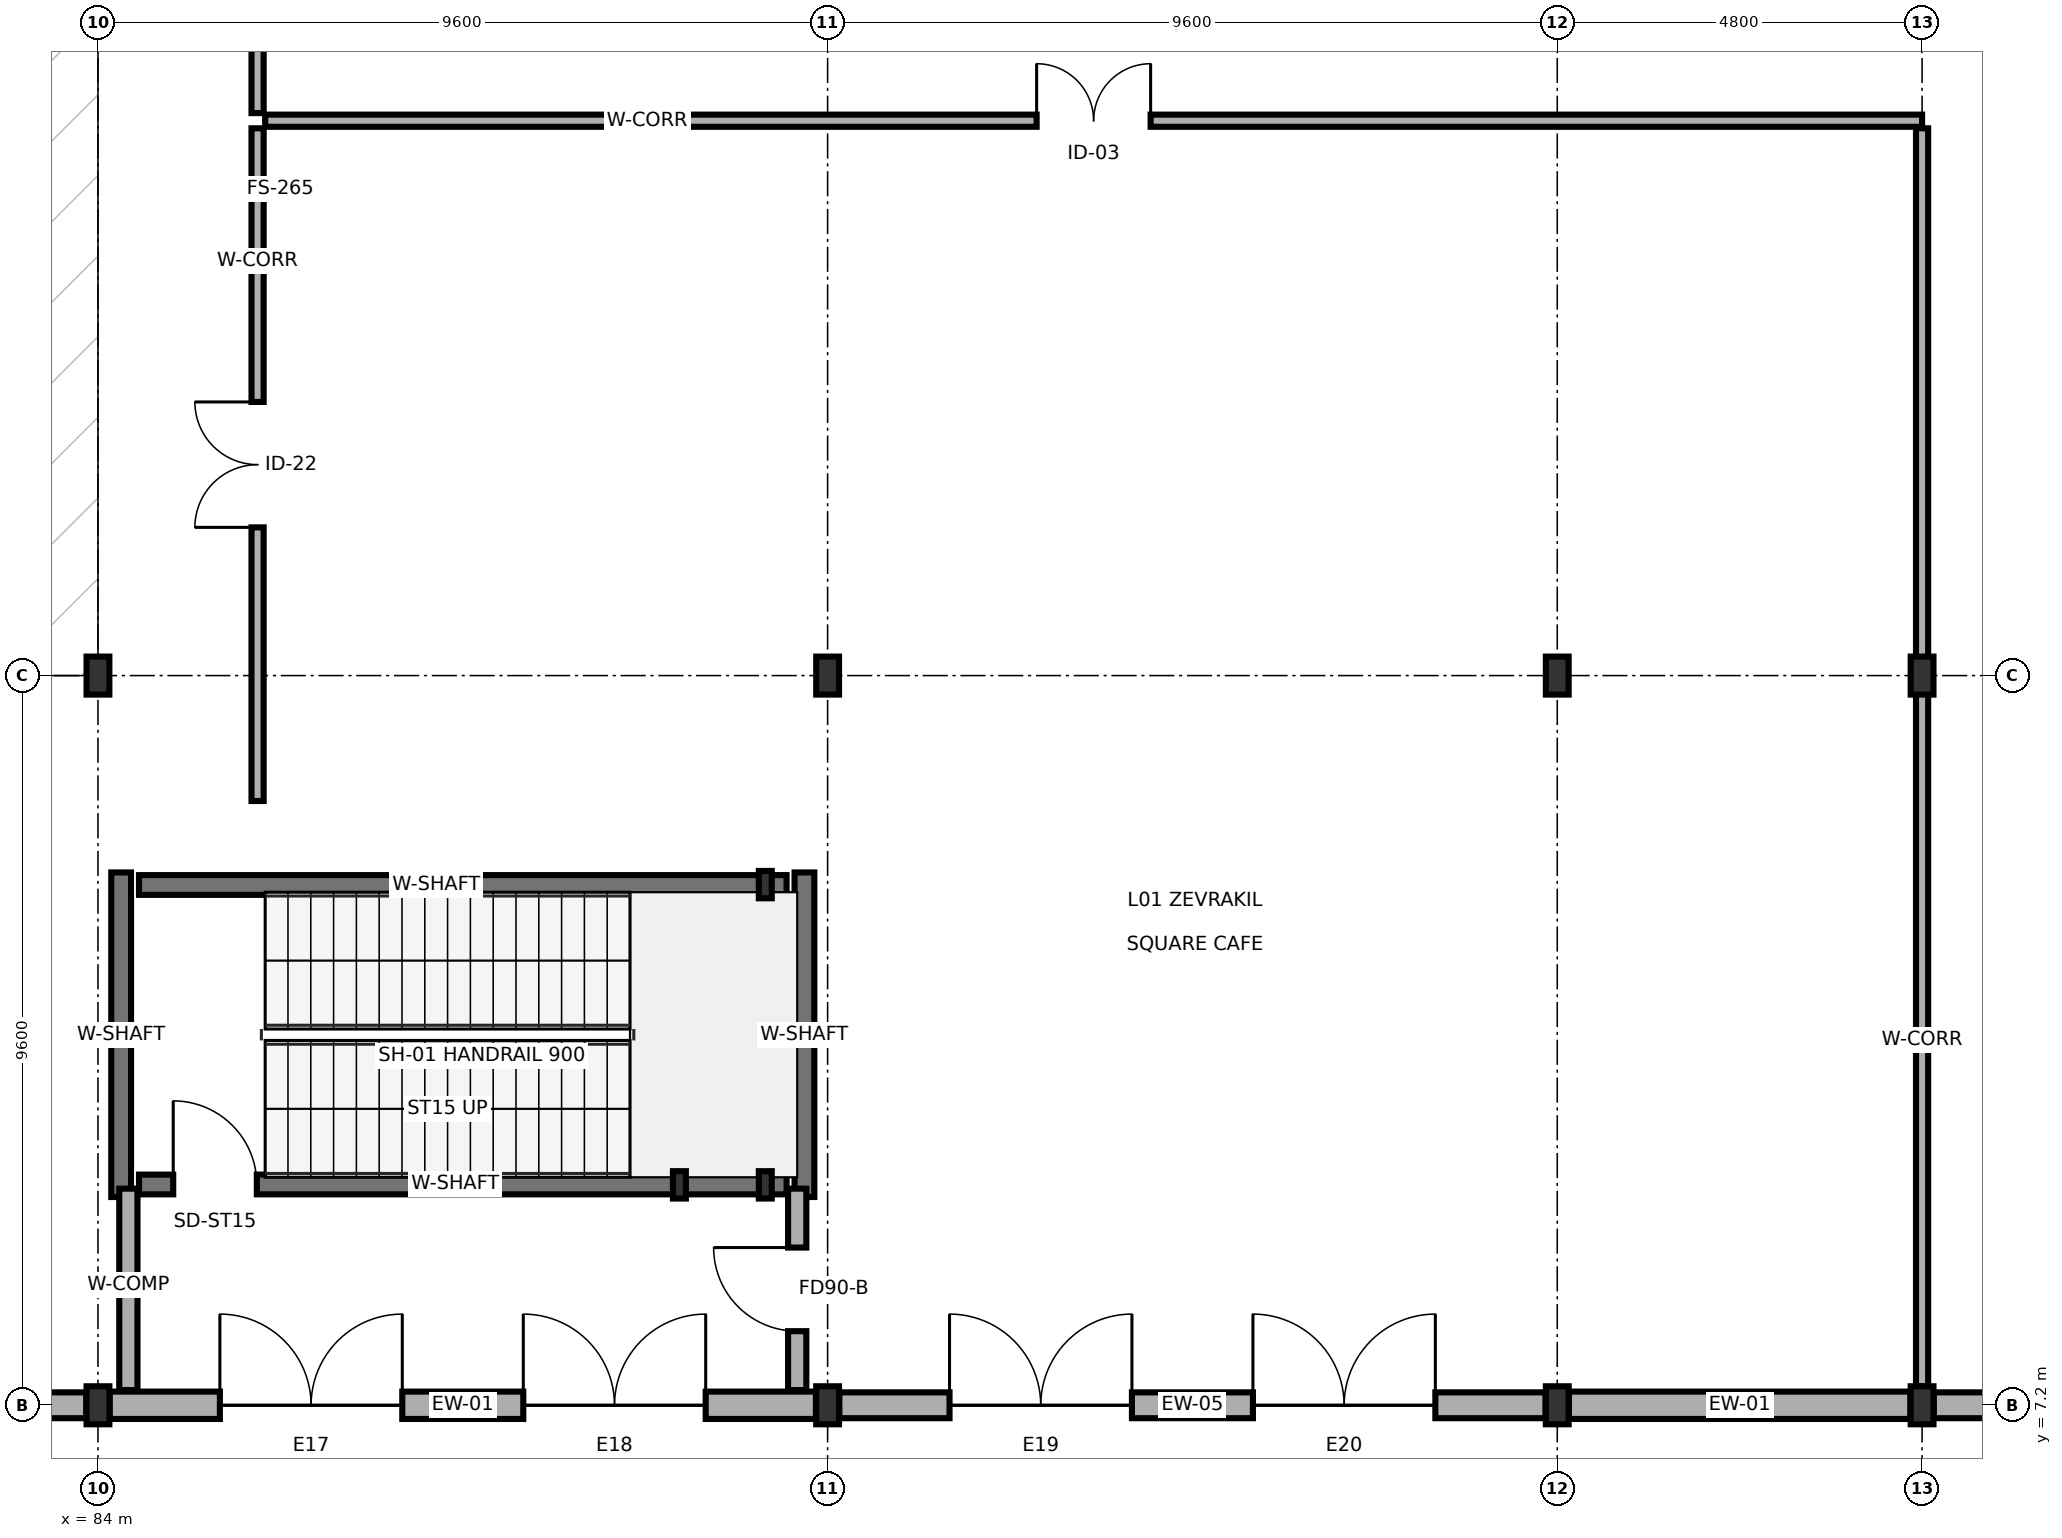
"""IFC4 building model, lengths in metres.
Left out: names, types, materials, properties, quantities, classifications, styles, units other than length and angle.
Written with IfcOpenShell. Run it as: python <this file> out.ifc"""

import sys

from ifc_helpers import new_model, si_unit, direction, frame, frame_2d, origin, origin_2d, place, context, subcontext, project, spatial, rectangle, i_section, extrude, element, fill, save


model = new_model("IFC4")
c1 = context("Model", 3, precision=1e-05, world=origin(), true_north=direction((0.0, 1.0)))
c2 = subcontext(c1, "Body", "Model", "MODEL_VIEW")
j1 = project(units=[si_unit("LENGTHUNIT", "METRE"), si_unit("PLANEANGLEUNIT", "RADIAN")], contexts=[c1])
p1 = place(None, origin())
s1 = spatial("IfcSite", under=j1, at=p1, CompositionType="ELEMENT")
p2 = place(p1, origin())
s2 = spatial("IfcBuilding", under=s1, at=p2, CompositionType="ELEMENT")
p3 = place(p2, origin())
s3 = spatial("IfcBuildingStorey", under=s2, at=p3, CompositionType="ELEMENT", Elevation=0.0)
for number, where, z_axis, x_axis in (
    (1, (84.0, 7.2, 0.0), (0.0, 0.0, 1.0), (1.0, 0.0, 0.0)),
    (2, (84.0, 16.8, 0.0), (0.0, 0.0, 1.0), (1.0, 0.0, 0.0)),
    (3, (93.6, 7.2, 0.0), (0.0, 0.0, 1.0), (1.0, 0.0, 0.0)),
    (4, (93.6, 16.8, 0.0), (0.0, 0.0, 1.0), (1.0, 0.0, 0.0)),
    (5, (103.2, 7.2, 0.0), (0.0, 0.0, 1.0), (1.0, 0.0, 0.0)),
    (6, (103.2, 16.8, 0.0), (0.0, 0.0, 1.0), (1.0, 0.0, 0.0)),
    (7, (108.0, 7.2, 0.0), (0.0, 0.0, 1.0), (1.0, 0.0, 0.0)),
    (8, (108.0, 16.8, 0.0), (0.0, 0.0, 1.0), (1.0, 0.0, 0.0)),
):
    element("IfcColumn", number, at=place(p3, frame(where, z_axis=z_axis, x_axis=x_axis)), inside=s3, PredefinedType="COLUMN", context=c2, shape_type="SweptSolid", body=[
        extrude(i_section(OverallWidth=0.3, OverallDepth=0.5, WebThickness=0.014, FlangeThickness=0.028, FilletRadius=0.027, at=origin_2d()), origin(), (0.0, 0.0, 1.0), 5.4),
    ])
for number, where, z_axis, x_axis in (
    (9, (91.65, 10.1, 0.0), (0.0, 0.0, 1.0), (1.0, 0.0, 0.0)),
    (10, (92.78, 10.1, 0.0), (0.0, 0.0, 1.0), (1.0, 0.0, 0.0)),
    (11, (92.78, 14.05, 0.0), (0.0, 0.0, 1.0), (1.0, 0.0, 0.0)),
):
    element("IfcColumn", number, at=place(p3, frame(where, z_axis=z_axis, x_axis=x_axis)), inside=s3, PredefinedType="PILASTER", context=c2, shape_type="SweptSolid", body=[
        extrude(i_section(OverallWidth=0.17, OverallDepth=0.36, WebThickness=0.008, FlangeThickness=0.013, FilletRadius=0.018, at=origin_2d()), origin(), (0.0, 0.0, 1.0), 5.4),
    ])
p4 = place(p3, frame((74.554, 7.2, 0.0), z_axis=(0.0, 0.0, 1.0), x_axis=(1.0, 0.0, 0.0)))
e12 = element("IfcWall", 12, at=p4, inside=s3, PredefinedType="SOLIDWALL", context=c2, shape_type="SweptSolid", body=[
    extrude(rectangle(XDim=9.292, YDim=0.34, at=frame_2d((4.646, 0.0))), origin(), (0.0, 0.0, 1.0), 4.625),
])
p5 = place(p4, frame((1.45, 0.0, 0.0)))
e13 = element("IfcOpeningElement", 13, at=p5, cuts=e12, PredefinedType="OPENING", context=c2, shape_type="SweptSolid", body=[
    extrude(rectangle(XDim=2.4, YDim=2.4, at=frame_2d((1.2, 1.2))), frame((0.0, 0.18, 0.0), z_axis=(0.0, -1.0, 0.0), x_axis=(1.0, 0.0, 0.0)), (0.0, 0.0, 1.0), 0.36),
])
p6 = place(p4, frame((5.442, 0.0, 0.0)))
e14 = element("IfcOpeningElement", 14, at=p6, cuts=e12, PredefinedType="OPENING", context=c2, shape_type="SweptSolid", body=[
    extrude(rectangle(XDim=2.4, YDim=2.4, at=frame_2d((1.2, 1.2))), frame((0.0, 0.18, 0.0), z_axis=(0.0, -1.0, 0.0), x_axis=(1.0, 0.0, 0.0)), (0.0, 0.0, 1.0), 0.36),
])
p7 = place(p3, frame((84.154, 7.2, 0.0), z_axis=(0.0, 0.0, 1.0), x_axis=(1.0, 0.0, 0.0)))
e15 = element("IfcWall", 15, at=p7, inside=s3, PredefinedType="SOLIDWALL", context=c2, shape_type="SweptSolid", body=[
    extrude(rectangle(XDim=9.292, YDim=0.36, at=frame_2d((4.646, 0.0))), origin(), (0.0, 0.0, 1.0), 4.625),
])
p8 = place(p7, frame((1.45, 0.0, 0.0)))
e16 = element("IfcOpeningElement", 16, at=p8, cuts=e15, PredefinedType="OPENING", context=c2, shape_type="SweptSolid", body=[
    extrude(rectangle(XDim=2.4, YDim=2.4, at=frame_2d((1.2, 1.2))), frame((0.0, 0.19, 0.0), z_axis=(0.0, -1.0, 0.0), x_axis=(1.0, 0.0, 0.0)), (0.0, 0.0, 1.0), 0.38),
])
p9 = place(p7, frame((5.442, 0.0, 0.0)))
e17 = element("IfcOpeningElement", 17, at=p9, cuts=e15, PredefinedType="OPENING", context=c2, shape_type="SweptSolid", body=[
    extrude(rectangle(XDim=2.4, YDim=2.4, at=frame_2d((1.2, 1.2))), frame((0.0, 0.19, 0.0), z_axis=(0.0, -1.0, 0.0), x_axis=(1.0, 0.0, 0.0)), (0.0, 0.0, 1.0), 0.38),
])
p10 = place(p3, frame((93.754, 7.2, 0.0), z_axis=(0.0, 0.0, 1.0), x_axis=(1.0, 0.0, 0.0)))
e18 = element("IfcWall", 18, at=p10, inside=s3, PredefinedType="SOLIDWALL", context=c2, shape_type="SweptSolid", body=[
    extrude(rectangle(XDim=9.292, YDim=0.34, at=frame_2d((4.646, 0.0))), origin(), (0.0, 0.0, 1.0), 4.625),
])
p11 = place(p10, frame((1.45, 0.0, 0.0)))
e19 = element("IfcOpeningElement", 19, at=p11, cuts=e18, PredefinedType="OPENING", context=c2, shape_type="SweptSolid", body=[
    extrude(rectangle(XDim=2.4, YDim=2.4, at=frame_2d((1.2, 1.2))), frame((0.0, 0.18, 0.0), z_axis=(0.0, -1.0, 0.0), x_axis=(1.0, 0.0, 0.0)), (0.0, 0.0, 1.0), 0.36),
])
p12 = place(p10, frame((5.442, 0.0, 0.0)))
e20 = element("IfcOpeningElement", 20, at=p12, cuts=e18, PredefinedType="OPENING", context=c2, shape_type="SweptSolid", body=[
    extrude(rectangle(XDim=2.4, YDim=2.4, at=frame_2d((1.2, 1.2))), frame((0.0, 0.18, 0.0), z_axis=(0.0, -1.0, 0.0), x_axis=(1.0, 0.0, 0.0)), (0.0, 0.0, 1.0), 0.36),
])
p13 = place(p3, frame((103.354, 7.2, 0.0), z_axis=(0.0, 0.0, 1.0), x_axis=(1.0, 0.0, 0.0)))
e21 = element("IfcWall", 21, at=p13, inside=s3, PredefinedType="SOLIDWALL", context=c2, shape_type="SweptSolid", body=[
    extrude(rectangle(XDim=4.492, YDim=0.36, at=frame_2d((2.246, 0.0))), origin(), (0.0, 0.0, 1.0), 4.625),
])
p14 = place(p3, frame((108.154, 7.2, 0.0), z_axis=(0.0, 0.0, 1.0), x_axis=(1.0, 0.0, 0.0)))
e22 = element("IfcWall", 22, at=p14, inside=s3, PredefinedType="SOLIDWALL", context=c2, shape_type="SweptSolid", body=[
    extrude(rectangle(XDim=9.292, YDim=0.34, at=frame_2d((4.646, 0.0))), origin(), (0.0, 0.0, 1.0), 4.625),
])
p15 = place(p14, frame((1.45, 0.0, 0.0)))
e23 = element("IfcOpeningElement", 23, at=p15, cuts=e22, PredefinedType="OPENING", context=c2, shape_type="SweptSolid", body=[
    extrude(rectangle(XDim=2.4, YDim=2.4, at=frame_2d((1.2, 1.2))), frame((0.0, 0.18, 0.0), z_axis=(0.0, -1.0, 0.0), x_axis=(1.0, 0.0, 0.0)), (0.0, 0.0, 1.0), 0.36),
])
p16 = place(p14, frame((5.442, 0.0, 0.0)))
e24 = element("IfcOpeningElement", 24, at=p16, cuts=e22, PredefinedType="OPENING", context=c2, shape_type="SweptSolid", body=[
    extrude(rectangle(XDim=2.4, YDim=2.4, at=frame_2d((1.2, 1.2))), frame((0.0, 0.18, 0.0), z_axis=(0.0, -1.0, 0.0), x_axis=(1.0, 0.0, 0.0)), (0.0, 0.0, 1.0), 0.36),
])
for number, where, z_axis, x_axis in (
    (25, (84.305, 9.94, 0.0), (0.0, 0.0, 1.0), (0.0, 1.0, 0.0)),
    (26, (93.295, 9.94, 0.0), (0.0, 0.0, 1.0), (0.0, 1.0, 0.0)),
):
    element("IfcWall", number, at=place(p3, frame(where, z_axis=z_axis, x_axis=x_axis)), inside=s3, PredefinedType="SHEAR", context=c2, shape_type="SweptSolid", body=[
        extrude(rectangle(XDim=4.27, YDim=0.26, at=frame_2d((2.135, 0.0))), origin(), (0.0, 0.0, 1.0), 5.14),
    ])
p17 = place(p3, frame((84.54, 10.105, 0.0), z_axis=(0.0, 0.0, 1.0), x_axis=(1.0, 0.0, 0.0)))
e27 = element("IfcWall", 27, at=p17, inside=s3, PredefinedType="SHEAR", context=c2, shape_type="SweptSolid", body=[
    extrude(rectangle(XDim=8.52, YDim=0.26, at=frame_2d((4.26, 0.0))), origin(), (0.0, 0.0, 1.0), 5.14),
])
p18 = place(p17, frame((0.45, 0.0, 0.0)))
e28 = element("IfcOpeningElement", 28, at=p18, cuts=e27, PredefinedType="OPENING", context=c2, shape_type="SweptSolid", body=[
    extrude(rectangle(XDim=1.1, YDim=2.2, at=frame_2d((0.55, 1.1))), frame((0.0, 0.14, 0.0), z_axis=(0.0, -1.0, 0.0), x_axis=(1.0, 0.0, 0.0)), (0.0, 0.0, 1.0), 0.28),
])
p19 = place(p3, frame((84.54, 14.045, 0.0), z_axis=(0.0, 0.0, 1.0), x_axis=(1.0, 0.0, 0.0)))
e29 = element("IfcWall", 29, at=p19, inside=s3, PredefinedType="SHEAR", context=c2, shape_type="SweptSolid", body=[
    extrude(rectangle(XDim=8.52, YDim=0.26, at=frame_2d((4.26, 0.0))), origin(), (0.0, 0.0, 1.0), 5.14),
])
p20 = place(p3, frame((86.1, 15.15, 0.0), z_axis=(0.0, 0.0, 1.0), x_axis=(0.0, 1.0, 0.0)))
e30 = element("IfcWall", 30, at=p20, inside=s3, PredefinedType="PARTITIONING", context=c2, shape_type="SweptSolid", body=[
    extrude(rectangle(XDim=8.85, YDim=0.16, at=frame_2d((4.425, 0.0))), origin(), (0.0, 0.0, 1.0), 4.685),
])
p21 = place(p20, frame((3.6, 0.0, 0.0)))
e31 = element("IfcOpeningElement", 31, at=p21, cuts=e30, PredefinedType="OPENING", context=c2, shape_type="SweptSolid", body=[
    extrude(rectangle(XDim=1.65, YDim=2.26, at=frame_2d((0.825, 1.13))), frame((0.0, 0.09, 0.0), z_axis=(0.0, -1.0, 0.0), x_axis=(1.0, 0.0, 0.0)), (0.0, 0.0, 1.0), 0.18),
])
p22 = place(p3, frame((86.1, 24.2, 0.0), z_axis=(0.0, 0.0, 1.0), x_axis=(0.0, 1.0, 0.0)))
e32 = element("IfcWall", 32, at=p22, inside=s3, PredefinedType="PARTITIONING", context=c2, shape_type="SweptSolid", body=[
    extrude(rectangle(XDim=21.2, YDim=0.16, at=frame_2d((10.6, 0.0))), origin(), (0.0, 0.0, 1.0), 4.685),
])
p23 = place(p22, frame((9.7, 0.0, 0.0)))
e33 = element("IfcOpeningElement", 33, at=p23, cuts=e32, PredefinedType="OPENING", context=c2, shape_type="SweptSolid", body=[
    extrude(rectangle(XDim=1.8, YDim=2.3, at=frame_2d((0.9, 1.15))), frame((0.0, 0.09, 0.0), z_axis=(0.0, -1.0, 0.0), x_axis=(1.0, 0.0, 0.0)), (0.0, 0.0, 1.0), 0.18),
])
p24 = place(p3, frame((86.2, 24.1, 0.0), z_axis=(0.0, 0.0, 1.0), x_axis=(1.0, 0.0, 0.0)))
e34 = element("IfcWall", 34, at=p24, inside=s3, PredefinedType="PARTITIONING", context=c2, shape_type="SweptSolid", body=[
    extrude(rectangle(XDim=21.8, YDim=0.16, at=frame_2d((10.9, 0.0))), origin(), (0.0, 0.0, 1.0), 4.625),
])
p25 = place(p24, frame((10.15, 0.0, 0.0)))
e35 = element("IfcOpeningElement", 35, at=p25, cuts=e34, PredefinedType="OPENING", context=c2, shape_type="SweptSolid", body=[
    extrude(rectangle(XDim=1.5, YDim=2.25, at=frame_2d((0.75, 1.125))), frame((0.0, 0.09, 0.0), z_axis=(0.0, -1.0, 0.0), x_axis=(1.0, 0.0, 0.0)), (0.0, 0.0, 1.0), 0.18),
])
p26 = place(p3, frame((108.0, 7.45, 0.0), z_axis=(0.0, 0.0, 1.0), x_axis=(0.0, 1.0, 0.0)))
e36 = element("IfcWall", 36, at=p26, inside=s3, PredefinedType="PARTITIONING", context=c2, shape_type="SweptSolid", body=[
    extrude(rectangle(XDim=16.55, YDim=0.16, at=frame_2d((8.275, 0.0))), origin(), (0.0, 0.0, 1.0), 4.625),
])
p27 = place(p3, frame((84.4, 7.4, 0.0), z_axis=(0.0, 0.0, 1.0), x_axis=(0.0, 1.0, 0.0)))
e37 = element("IfcWall", 37, at=p27, inside=s3, PredefinedType="SOLIDWALL", context=c2, shape_type="SweptSolid", body=[
    extrude(rectangle(XDim=2.65, YDim=0.24, at=frame_2d((1.325, 0.0))), origin(), (0.0, 0.0, 1.0), 5.14),
])
p28 = place(p3, frame((93.2, 7.4, 0.0), z_axis=(0.0, 0.0, 1.0), x_axis=(0.0, 1.0, 0.0)))
e38 = element("IfcWall", 38, at=p28, inside=s3, PredefinedType="SOLIDWALL", context=c2, shape_type="SweptSolid", body=[
    extrude(rectangle(XDim=2.65, YDim=0.24, at=frame_2d((1.325, 0.0))), origin(), (0.0, 0.0, 1.0), 5.14),
])
p29 = place(p28, frame((0.775, 0.0, 0.0)))
e39 = element("IfcOpeningElement", 39, at=p29, cuts=e38, PredefinedType="OPENING", context=c2, shape_type="SweptSolid", body=[
    extrude(rectangle(XDim=1.1, YDim=2.2, at=frame_2d((0.55, 1.1))), frame((0.0, 0.13, 0.0), z_axis=(0.0, -1.0, 0.0), x_axis=(1.0, 0.0, 0.0)), (0.0, 0.0, 1.0), 0.26),
])
p30 = place(p8, frame((2.4, 0.0, 0.0), z_axis=(0.0, 0.0, 1.0), x_axis=(-1.0, 0.0, 0.0)))
e40 = element("IfcDoor", 40, at=p30, inside=s3, OperationType="DOUBLE_DOOR_SINGLE_SWING", PredefinedType="DOOR", context=c2, shape_type="SweptSolid", body=[
    extrude(rectangle(XDim=2.4, YDim=2.4, at=frame_2d((1.2, 1.2))), frame((0.0, 0.025, 0.0), z_axis=(0.0, -1.0, 0.0), x_axis=(1.0, 0.0, 0.0)), (0.0, 0.0, 1.0), 0.05),
])
fill(e16, e40)
p31 = place(p9, frame((2.4, 0.0, 0.0), z_axis=(0.0, 0.0, 1.0), x_axis=(-1.0, 0.0, 0.0)))
e41 = element("IfcDoor", 41, at=p31, inside=s3, OperationType="DOUBLE_DOOR_SINGLE_SWING", PredefinedType="DOOR", context=c2, shape_type="SweptSolid", body=[
    extrude(rectangle(XDim=2.4, YDim=2.4, at=frame_2d((1.2, 1.2))), frame((0.0, 0.025, 0.0), z_axis=(0.0, -1.0, 0.0), x_axis=(1.0, 0.0, 0.0)), (0.0, 0.0, 1.0), 0.05),
])
fill(e17, e41)
p32 = place(p11, frame((2.4, 0.0, 0.0), z_axis=(0.0, 0.0, 1.0), x_axis=(-1.0, 0.0, 0.0)))
e42 = element("IfcDoor", 42, at=p32, inside=s3, OperationType="DOUBLE_DOOR_SINGLE_SWING", PredefinedType="DOOR", context=c2, shape_type="SweptSolid", body=[
    extrude(rectangle(XDim=2.4, YDim=2.4, at=frame_2d((1.2, 1.2))), frame((0.0, 0.025, 0.0), z_axis=(0.0, -1.0, 0.0), x_axis=(1.0, 0.0, 0.0)), (0.0, 0.0, 1.0), 0.05),
])
fill(e19, e42)
p33 = place(p12, frame((2.4, 0.0, 0.0), z_axis=(0.0, 0.0, 1.0), x_axis=(-1.0, 0.0, 0.0)))
e43 = element("IfcDoor", 43, at=p33, inside=s3, OperationType="DOUBLE_DOOR_SINGLE_SWING", PredefinedType="DOOR", context=c2, shape_type="SweptSolid", body=[
    extrude(rectangle(XDim=2.4, YDim=2.4, at=frame_2d((1.2, 1.2))), frame((0.0, 0.025, 0.0), z_axis=(0.0, -1.0, 0.0), x_axis=(1.0, 0.0, 0.0)), (0.0, 0.0, 1.0), 0.05),
])
fill(e20, e43)
p34 = place(p18, origin())
e44 = element("IfcDoor", 44, at=p34, inside=s3, OperationType="SINGLE_SWING_LEFT", PredefinedType="DOOR", context=c2, shape_type="SweptSolid", body=[
    extrude(rectangle(XDim=1.1, YDim=2.2, at=frame_2d((0.55, 1.1))), frame((0.0, 0.025, 0.0), z_axis=(0.0, -1.0, 0.0), x_axis=(1.0, 0.0, 0.0)), (0.0, 0.0, 1.0), 0.05),
])
fill(e28, e44)
p35 = place(p21, origin())
e45 = element("IfcDoor", 45, at=p35, inside=s3, OperationType="DOUBLE_DOOR_SINGLE_SWING", PredefinedType="DOOR", context=c2, shape_type="SweptSolid", body=[
    extrude(rectangle(XDim=1.65, YDim=2.26, at=frame_2d((0.825, 1.13))), frame((0.0, 0.025, 0.0), z_axis=(0.0, -1.0, 0.0), x_axis=(1.0, 0.0, 0.0)), (0.0, 0.0, 1.0), 0.05),
])
fill(e31, e45)
p36 = place(p25, origin())
e46 = element("IfcDoor", 46, at=p36, inside=s3, OperationType="DOUBLE_DOOR_SINGLE_SWING", PredefinedType="DOOR", context=c2, shape_type="SweptSolid", body=[
    extrude(rectangle(XDim=1.5, YDim=2.25, at=frame_2d((0.75, 1.125))), frame((0.0, 0.025, 0.0), z_axis=(0.0, -1.0, 0.0), x_axis=(1.0, 0.0, 0.0)), (0.0, 0.0, 1.0), 0.05),
])
fill(e35, e46)
p37 = place(p29, origin())
e47 = element("IfcDoor", 47, at=p37, inside=s3, OperationType="SINGLE_SWING_RIGHT", PredefinedType="DOOR", context=c2, shape_type="SweptSolid", body=[
    extrude(rectangle(XDim=1.1, YDim=2.2, at=frame_2d((0.55, 1.1))), frame((0.0, 0.025, 0.0), z_axis=(0.0, -1.0, 0.0), x_axis=(1.0, 0.0, 0.0)), (0.0, 0.0, 1.0), 0.05),
])
fill(e39, e47)
save(model, sys.argv[1])
